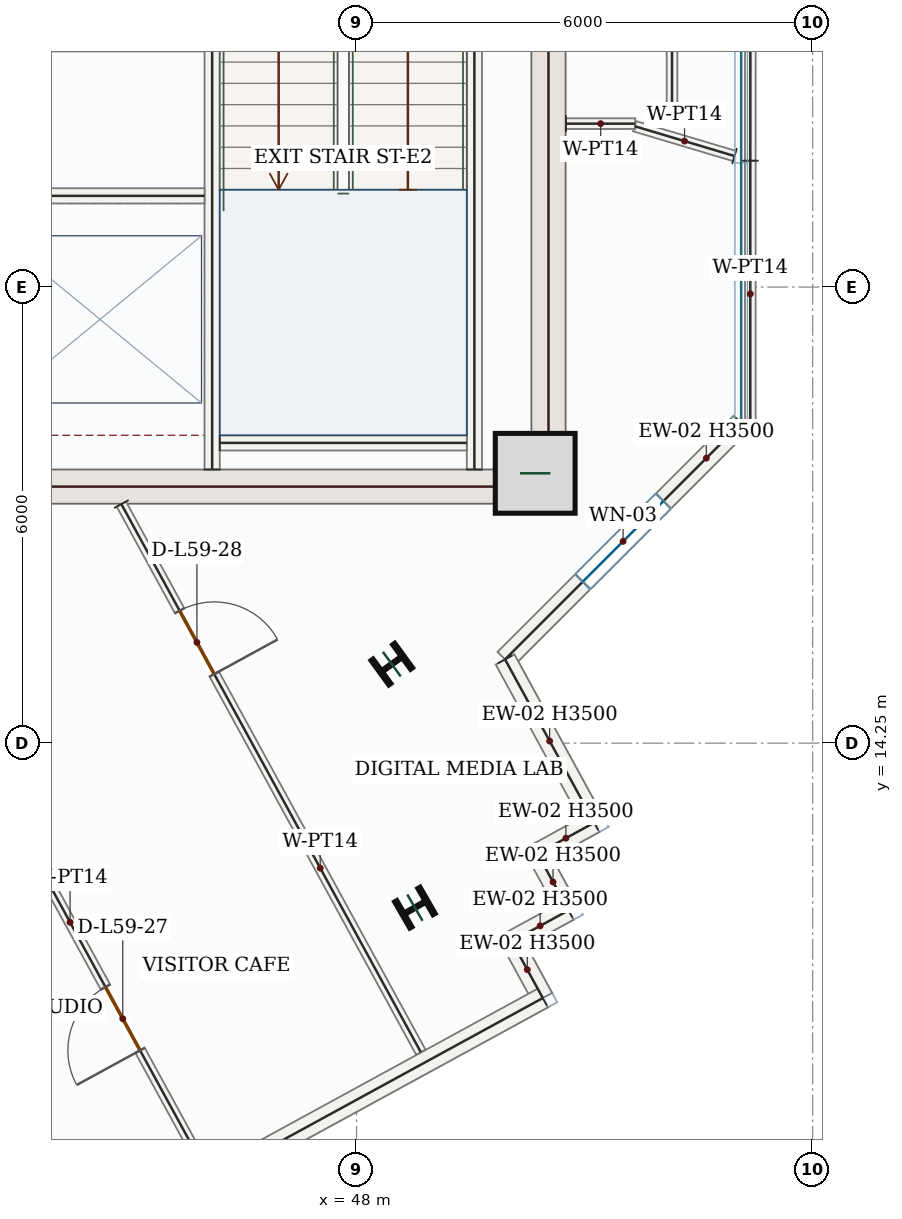
"""IFC4 building model, lengths in metres.
Left out: names, types, materials, properties, quantities, classifications, styles, units other than length and angle.
Written with IfcOpenShell. Run it as: python <this file> out.ifc"""

import sys

from ifc_helpers import new_model, si_unit, direction, frame, frame_2d, origin, origin_2d, place, context, subcontext, project, spatial, rectangle, i_section, extrude, source, transform, mapped, element, fill, save


model = new_model("IFC4")
c1 = context("Model", 3, precision=1e-05, world=origin(), true_north=direction((0.0, 1.0)))
c2 = subcontext(c1, "Body", "Model", "MODEL_VIEW")
j1 = project(units=[si_unit("LENGTHUNIT", "METRE"), si_unit("PLANEANGLEUNIT", "RADIAN")], contexts=[c1])
p1 = place(None, origin())
s1 = spatial("IfcSite", under=j1, at=p1, CompositionType="ELEMENT")
p2 = place(p1, origin())
s2 = spatial("IfcBuilding", under=s1, at=p2, CompositionType="ELEMENT")
p3 = place(p2, frame((0.0, 0.0, 250.35)))
s3 = spatial("IfcBuildingStorey", under=s2, at=p3, CompositionType="ELEMENT", Elevation=250.35)
m1 = source(origin(), c2, "Body", "SweptSolid", [
    extrude(rectangle(XDim=8.55, YDim=0.45, at=frame_2d((4.275, 0.0))), origin(), (0.0, 0.0, 1.0), 3.5),
])
p4 = place(p3, frame((50.525, 17.4, 0.0), z_axis=(0.0, 0.0, 1.0), x_axis=(0.0, 1.0, 0.0)))
e1 = element("IfcWall", 1, at=p4, inside=s3, PredefinedType="SHEAR", context=c2, shape_type="MappedRepresentation", body=[
    mapped(m1, transform((0.0, 0.0, 0.0), x_axis=(1.0, 0.0, 0.0), y_axis=(0.0, 1.0, 0.0), z_axis=(0.0, 0.0, 1.0), scale=1.0)),
])
m2 = source(origin(), c2, "Body", "SweptSolid", [
    extrude(rectangle(XDim=7.1, YDim=0.45, at=frame_2d((3.55, 0.0))), origin(), (0.0, 0.0, 1.0), 3.5),
])
p5 = place(p3, frame((43.2, 17.625, 0.0), z_axis=(0.0, 0.0, 1.0), x_axis=(1.0, 0.0, 0.0)))
e2 = element("IfcWall", 2, at=p5, inside=s3, PredefinedType="SHEAR", context=c2, shape_type="MappedRepresentation", body=[
    mapped(m2, transform((0.0, 0.0, 0.0), x_axis=(1.0, 0.0, 0.0), y_axis=(0.0, 1.0, 0.0), z_axis=(0.0, 0.0, 1.0), scale=1.0)),
])
m3 = source(origin(), c2, "Body", "SweptSolid", [
    extrude(rectangle(XDim=1.05, YDim=1.05, at=origin_2d()), origin(), (0.0, 0.0, 1.0), 3.75),
])
p6 = place(p3, frame((50.35, 17.8, 0.0), z_axis=(0.0, 0.0, 1.0), x_axis=(1.0, 0.0, 0.0)))
e3 = element("IfcColumn", 3, at=p6, inside=s3, PredefinedType="COLUMN", context=c2, shape_type="MappedRepresentation", body=[
    mapped(m3, transform((0.0, 0.0, 0.0), x_axis=(1.0, 0.0, 0.0), y_axis=(0.0, 1.0, 0.0), z_axis=(0.0, 0.0, 1.0), scale=1.0)),
])
m4 = source(origin(), c2, "Body", "SweptSolid", [
    extrude(i_section(OverallWidth=0.399, OverallDepth=0.386, WebThickness=0.021, FlangeThickness=0.033, FilletRadius=0.018, at=origin_2d()), origin(), (0.0, 0.0, 1.0), 3.75),
])
for number, where, z_axis, x_axis in (
    (4, (48.464, 15.289, 0.0), (0.0, 0.0, 1.0), (-0.588, 0.809, 0.0)),
    (5, (48.768, 12.086, 0.0), (0.0, 0.0, 1.0), (-0.5, 0.866, 0.0)),
):
    element("IfcColumn", number, at=place(p3, frame(where, z_axis=z_axis, x_axis=x_axis)), inside=s3, PredefinedType="COLUMN", context=c2, shape_type="MappedRepresentation", body=[
        mapped(m4, transform((0.0, 0.0, 0.0), x_axis=(1.0, 0.0, 0.0), y_axis=(0.0, 1.0, 0.0), z_axis=(0.0, 0.0, 1.0), scale=1.0)),
    ])
p7 = place(p3, frame((53.06, 18.458, 0.0), z_axis=(0.0, 0.0, 1.0), x_axis=(-0.707106781187, -0.707106781187, 0.0)))
e6 = element("IfcWall", 6, at=p7, inside=s3, PredefinedType="SOLIDWALL", context=c2, shape_type="SweptSolid", body=[
    extrude(rectangle(XDim=4.394, YDim=0.28, at=frame_2d((2.197, 0.0))), origin(), (0.0, 0.0, 1.0), 3.5),
])
p8 = place(p7, frame((1.447, 0.0, 0.85)))
e7 = element("IfcOpeningElement", 7, at=p8, cuts=e6, PredefinedType="OPENING", context=c2, shape_type="SweptSolid", body=[
    extrude(rectangle(XDim=1.5, YDim=1.5, at=frame_2d((0.75, 0.75))), frame((0.0, 0.15, 0.0), z_axis=(0.0, -1.0, 0.0), x_axis=(1.0, 0.0, 0.0)), (0.0, 0.0, 1.0), 0.3),
])
m5 = source(origin(), c2, "Body", "SweptSolid", [
    extrude(rectangle(XDim=2.448, YDim=0.28, at=frame_2d((1.224, 0.0))), origin(), (0.0, 0.0, 1.0), 3.5),
])
p9 = place(p3, frame((49.953, 15.351, 0.0), z_axis=(0.0, 0.0, 1.0), x_axis=(0.47951595933, -0.877533158774, 0.0)))
e8 = element("IfcWall", 8, at=p9, inside=s3, PredefinedType="SOLIDWALL", context=c2, shape_type="MappedRepresentation", body=[
    mapped(m5, transform((0.0, 0.0, 0.0), x_axis=(1.0, 0.0, 0.0), y_axis=(0.0, 1.0, 0.0), z_axis=(0.0, 0.0, 1.0), scale=1.0)),
])
m6 = source(origin(), c2, "Body", "SweptSolid", [
    extrude(rectangle(XDim=0.85, YDim=0.28, at=frame_2d((0.425, 0.0))), origin(), (0.0, 0.0, 1.0), 3.5),
])
p10 = place(p3, frame((51.127, 13.204, 0.0), z_axis=(0.0, 0.0, 1.0), x_axis=(-0.87752219781, -0.479536017782, 0.0)))
e9 = element("IfcWall", 9, at=p10, inside=s3, PredefinedType="SOLIDWALL", context=c2, shape_type="MappedRepresentation", body=[
    mapped(m6, transform((0.0, 0.0, 0.0), x_axis=(1.0, 0.0, 0.0), y_axis=(0.0, 1.0, 0.0), z_axis=(0.0, 0.0, 1.0), scale=1.0)),
])
m7 = source(origin(), c2, "Body", "SweptSolid", [
    extrude(rectangle(XDim=0.85, YDim=0.28, at=frame_2d((0.425, 0.0))), origin(), (0.0, 0.0, 1.0), 3.5),
])
for number, where, z_axis, x_axis in (
    (10, (50.381, 12.796, 0.0), (0.0, 0.0, 1.0), (0.48, -0.877, 0.0)),
    (11, (50.789, 12.05, 0.0), (0.0, 0.0, 1.0), (-0.878, -0.479, 0.0)),
):
    element("IfcWall", number, at=place(p3, frame(where, z_axis=z_axis, x_axis=x_axis)), inside=s3, PredefinedType="SOLIDWALL", context=c2, shape_type="MappedRepresentation", body=[
        mapped(m7, transform((0.0, 0.0, 0.0), x_axis=(1.0, 0.0, 0.0), y_axis=(0.0, 1.0, 0.0), z_axis=(0.0, 0.0, 1.0), scale=1.0)),
    ])
p11 = place(p3, frame((50.042, 11.643, 0.0), z_axis=(0.0, 0.0, 1.0), x_axis=(0.479536017782, -0.87752219781, 0.0)))
e12 = element("IfcWall", 12, at=p11, inside=s3, PredefinedType="SOLIDWALL", context=c2, shape_type="MappedRepresentation", body=[
    mapped(m6, transform((0.0, 0.0, 0.0), x_axis=(1.0, 0.0, 0.0), y_axis=(0.0, 1.0, 0.0), z_axis=(0.0, 0.0, 1.0), scale=1.0)),
])
m8 = source(origin(), c2, "Body", "SweptSolid", [
    extrude(rectangle(XDim=9.92, YDim=0.28, at=frame_2d((4.96, 0.0))), origin(), (0.0, 0.0, 1.0), 3.5),
])
p12 = place(p3, frame((50.45, 10.896, 0.0), z_axis=(0.0, 0.0, 1.0), x_axis=(-0.877572768104, -0.479443465574, 0.0)))
e13 = element("IfcWall", 13, at=p12, inside=s3, PredefinedType="SOLIDWALL", context=c2, shape_type="MappedRepresentation", body=[
    mapped(m8, transform((0.0, 0.0, 0.0), x_axis=(1.0, 0.0, 0.0), y_axis=(0.0, 1.0, 0.0), z_axis=(0.0, 0.0, 1.0), scale=1.0)),
])
m9 = source(origin(), c2, "Body", "SweptSolid", [
    extrude(rectangle(XDim=7.87, YDim=0.2, at=frame_2d((3.935, 0.0))), origin(), (0.0, 0.0, 1.0), 3.5),
])
p13 = place(p3, frame((49.55, 17.85, 0.0), z_axis=(0.0, 0.0, 1.0), x_axis=(0.0, 1.0, 0.0)))
e14 = element("IfcWall", 14, at=p13, inside=s3, PredefinedType="SOLIDWALL", context=c2, shape_type="MappedRepresentation", body=[
    mapped(m9, transform((0.0, 0.0, 0.0), x_axis=(1.0, 0.0, 0.0), y_axis=(0.0, 1.0, 0.0), z_axis=(0.0, 0.0, 1.0), scale=1.0)),
])
p14 = place(p3, frame((46.1, 17.85, 0.0), z_axis=(0.0, 0.0, 1.0), x_axis=(0.0, 1.0, 0.0)))
e15 = element("IfcWall", 15, at=p14, inside=s3, PredefinedType="SOLIDWALL", context=c2, shape_type="SweptSolid", body=[
    extrude(rectangle(XDim=8.0, YDim=0.2, at=frame_2d((4.0, 0.0))), origin(), (0.0, 0.0, 1.0), 3.5),
])
p15 = place(p14, frame((6.3, 0.0, 0.0)))
e16 = element("IfcOpeningElement", 16, at=p15, cuts=e15, PredefinedType="OPENING", context=c2, shape_type="SweptSolid", body=[
    extrude(rectangle(XDim=1.05, YDim=2.15, at=frame_2d((0.525, 1.075))), frame((0.0, 0.11, 0.0), z_axis=(0.0, -1.0, 0.0), x_axis=(1.0, 0.0, 0.0)), (0.0, 0.0, 1.0), 0.22),
])
m10 = source(origin(), c2, "Body", "SweptSolid", [
    extrude(rectangle(XDim=3.25, YDim=0.2, at=frame_2d((1.625, 0.0))), origin(), (0.0, 0.0, 1.0), 3.5),
])
p16 = place(p3, frame((46.2, 18.2, 0.0), z_axis=(0.0, 0.0, 1.0), x_axis=(1.0, 0.0, 0.0)))
e17 = element("IfcWall", 17, at=p16, inside=s3, PredefinedType="SOLIDWALL", context=c2, shape_type="MappedRepresentation", body=[
    mapped(m10, transform((0.0, 0.0, 0.0), x_axis=(1.0, 0.0, 0.0), y_axis=(0.0, 1.0, 0.0), z_axis=(0.0, 0.0, 1.0), scale=1.0)),
])
m11 = source(origin(), c2, "Body", "SweptSolid", [
    extrude(rectangle(XDim=2.75, YDim=0.2, at=frame_2d((1.375, 0.0))), origin(), (0.0, 0.0, 1.0), 3.5),
])
p17 = place(p3, frame((43.25, 21.45, 0.0), z_axis=(0.0, 0.0, 1.0), x_axis=(1.0, 0.0, 0.0)))
e18 = element("IfcWall", 18, at=p17, inside=s3, PredefinedType="SOLIDWALL", context=c2, shape_type="MappedRepresentation", body=[
    mapped(m11, transform((0.0, 0.0, 0.0), x_axis=(1.0, 0.0, 0.0), y_axis=(0.0, 1.0, 0.0), z_axis=(0.0, 0.0, 1.0), scale=1.0)),
])
p18 = place(p3, frame((44.906, 17.395, 0.0), z_axis=(0.0, 0.0, 1.0), x_axis=(0.479449534835, -0.877569452264, 0.0)))
e19 = element("IfcWall", 19, at=p18, inside=s3, PredefinedType="PARTITIONING", context=c2, shape_type="SweptSolid", body=[
    extrude(rectangle(XDim=8.216, YDim=0.14, at=frame_2d((4.108, 0.0))), origin(), (0.0, 0.0, 1.0), 3.5),
])
p19 = place(p18, frame((1.599, 0.0, 0.0)))
e20 = element("IfcOpeningElement", 20, at=p19, cuts=e19, PredefinedType="OPENING", context=c2, shape_type="SweptSolid", body=[
    extrude(rectangle(XDim=0.95, YDim=2.15, at=frame_2d((0.475, 1.075))), frame((0.0, 0.08, 0.0), z_axis=(0.0, -1.0, 0.0), x_axis=(1.0, 0.0, 0.0)), (0.0, 0.0, 1.0), 0.16),
])
p20 = place(p3, frame((46.01, 8.636, 0.0), z_axis=(0.0, 0.0, 1.0), x_axis=(-0.479410597023, 0.877590724348, 0.0)))
e21 = element("IfcWall", 21, at=p20, inside=s3, PredefinedType="PARTITIONING", context=c2, shape_type="SweptSolid", body=[
    extrude(rectangle(XDim=4.532, YDim=0.14, at=frame_2d((2.266, 0.0))), origin(), (0.0, 0.0, 1.0), 3.5),
])
p21 = place(p20, frame((1.791, 0.0, 0.0)))
e22 = element("IfcOpeningElement", 22, at=p21, cuts=e21, PredefinedType="OPENING", context=c2, shape_type="SweptSolid", body=[
    extrude(rectangle(XDim=0.95, YDim=2.15, at=frame_2d((0.475, 1.075))), frame((0.0, 0.08, 0.0), z_axis=(0.0, -1.0, 0.0), x_axis=(1.0, 0.0, 0.0)), (0.0, 0.0, 1.0), 0.16),
])
p22 = place(p3, frame((52.15, 22.406, 0.0), z_axis=(0.0, 0.0, 1.0), x_axis=(-2.657666e-05, 0.999999999647, 0.0)))
e23 = element("IfcWall", 23, at=p22, inside=s3, PredefinedType="PARTITIONING", context=c2, shape_type="SweptSolid", body=[
    extrude(rectangle(XDim=9.186, YDim=0.14, at=frame_2d((4.593, 0.0))), origin(), (0.0, 0.0, 1.0), 3.5),
])
p23 = place(p22, frame((2.883, 0.0, 0.0)))
e24 = element("IfcOpeningElement", 24, at=p23, cuts=e23, PredefinedType="OPENING", context=c2, shape_type="SweptSolid", body=[
    extrude(rectangle(XDim=0.95, YDim=2.15, at=frame_2d((0.475, 1.075))), frame((0.0, 0.08, 0.0), z_axis=(0.0, -1.0, 0.0), x_axis=(1.0, 0.0, 0.0)), (0.0, 0.0, 1.0), 0.16),
])
m12 = source(origin(), c2, "Body", "SweptSolid", [
    extrude(rectangle(XDim=6.722, YDim=0.14, at=frame_2d((3.361, 0.0))), origin(), (0.0, 0.0, 1.0), 3.5),
])
p24 = place(p3, frame((53.184, 28.634, 0.0), z_axis=(0.0, 0.0, 1.0), x_axis=(-0.000544820492, -0.999999851585, 0.0)))
e25 = element("IfcWall", 25, at=p24, inside=s3, PredefinedType="PARTITIONING", context=c2, shape_type="MappedRepresentation", body=[
    mapped(m12, transform((0.0, 0.0, 0.0), x_axis=(1.0, 0.0, 0.0), y_axis=(0.0, 1.0, 0.0), z_axis=(0.0, 0.0, 1.0), scale=1.0)),
])
m13 = source(origin(), c2, "Body", "SweptSolid", [
    extrude(rectangle(XDim=1.373, YDim=0.14, at=frame_2d((0.687, 0.0))), origin(), (0.0, 0.0, 1.0), 3.5),
])
p25 = place(p3, frame((52.972, 21.974, 0.0), z_axis=(0.0, 0.0, 1.0), x_axis=(-0.958236472503, 0.285977031883, 0.0)))
e26 = element("IfcWall", 26, at=p25, inside=s3, PredefinedType="PARTITIONING", context=c2, shape_type="MappedRepresentation", body=[
    mapped(m13, transform((0.0, 0.0, 0.0), x_axis=(1.0, 0.0, 0.0), y_axis=(0.0, 1.0, 0.0), z_axis=(0.0, 0.0, 1.0), scale=1.0)),
])
m14 = source(origin(), c2, "Body", "SweptSolid", [
    extrude(rectangle(XDim=0.912, YDim=0.14, at=frame_2d((0.456, 0.0))), origin(), (0.0, 0.0, 1.0), 3.5),
])
p26 = place(p3, frame((50.755, 22.4, 0.0), z_axis=(0.0, 0.0, 1.0), x_axis=(1.0, 0.0, 0.0)))
e27 = element("IfcWall", 27, at=p26, inside=s3, PredefinedType="PARTITIONING", context=c2, shape_type="MappedRepresentation", body=[
    mapped(m14, transform((0.0, 0.0, 0.0), x_axis=(1.0, 0.0, 0.0), y_axis=(0.0, 1.0, 0.0), z_axis=(0.0, 0.0, 1.0), scale=1.0)),
])
m15 = source(origin(), c2, "Body", "SweptSolid", [
    extrude(rectangle(XDim=3.504, YDim=0.14, at=frame_2d((1.752, 0.0))), origin(), (0.0, 0.0, 1.0), 3.5),
])
p27 = place(p3, frame((53.18, 21.912, 0.0), z_axis=(0.0, 0.0, 1.0), x_axis=(0.0, -1.0, 0.0)))
e28 = element("IfcWall", 28, at=p27, inside=s3, PredefinedType="PARTITIONING", context=c2, shape_type="MappedRepresentation", body=[
    mapped(m15, transform((0.0, 0.0, 0.0), x_axis=(1.0, 0.0, 0.0), y_axis=(0.0, 1.0, 0.0), z_axis=(0.0, 0.0, 1.0), scale=1.0)),
])
m16 = source(origin(), c2, "Body", "SweptSolid", [
    extrude(rectangle(XDim=1.5, YDim=1.5, at=frame_2d((0.75, 0.75))), frame((0.0, 0.03, 0.0), z_axis=(0.0, -1.0, 0.0), x_axis=(1.0, 0.0, 0.0)), (0.0, 0.0, 1.0), 0.06),
])
p28 = place(p8, origin())
e29 = element("IfcWindow", 29, at=p28, inside=s3, PartitioningType="SINGLE_PANEL", PredefinedType="WINDOW", context=c2, shape_type="MappedRepresentation", body=[
    mapped(m16, transform((0.0, 0.0, 0.0), x_axis=(1.0, 0.0, 0.0), y_axis=(0.0, 1.0, 0.0), z_axis=(0.0, 0.0, 1.0), scale=1.0)),
])
fill(e7, e29)
m17 = source(origin(), c2, "Body", "SweptSolid", [
    extrude(rectangle(XDim=0.95, YDim=2.15, at=frame_2d((0.475, 1.075))), frame((0.0, 0.025, 0.0), z_axis=(0.0, -1.0, 0.0), x_axis=(1.0, 0.0, 0.0)), (0.0, 0.0, 1.0), 0.05),
])
p29 = place(p21, origin())
e30 = element("IfcDoor", 30, at=p29, inside=s3, OperationType="SINGLE_SWING_LEFT", PredefinedType="DOOR", context=c2, shape_type="MappedRepresentation", body=[
    mapped(m17, transform((0.0, 0.0, 0.0), x_axis=(1.0, 0.0, 0.0), y_axis=(0.0, 1.0, 0.0), z_axis=(0.0, 0.0, 1.0), scale=1.0)),
])
fill(e22, e30)
p30 = place(p19, origin())
e31 = element("IfcDoor", 31, at=p30, inside=s3, OperationType="SINGLE_SWING_RIGHT", PredefinedType="DOOR", context=c2, shape_type="MappedRepresentation", body=[
    mapped(m17, transform((0.0, 0.0, 0.0), x_axis=(1.0, 0.0, 0.0), y_axis=(0.0, 1.0, 0.0), z_axis=(0.0, 0.0, 1.0), scale=1.0)),
])
fill(e20, e31)
save(model, sys.argv[1])
